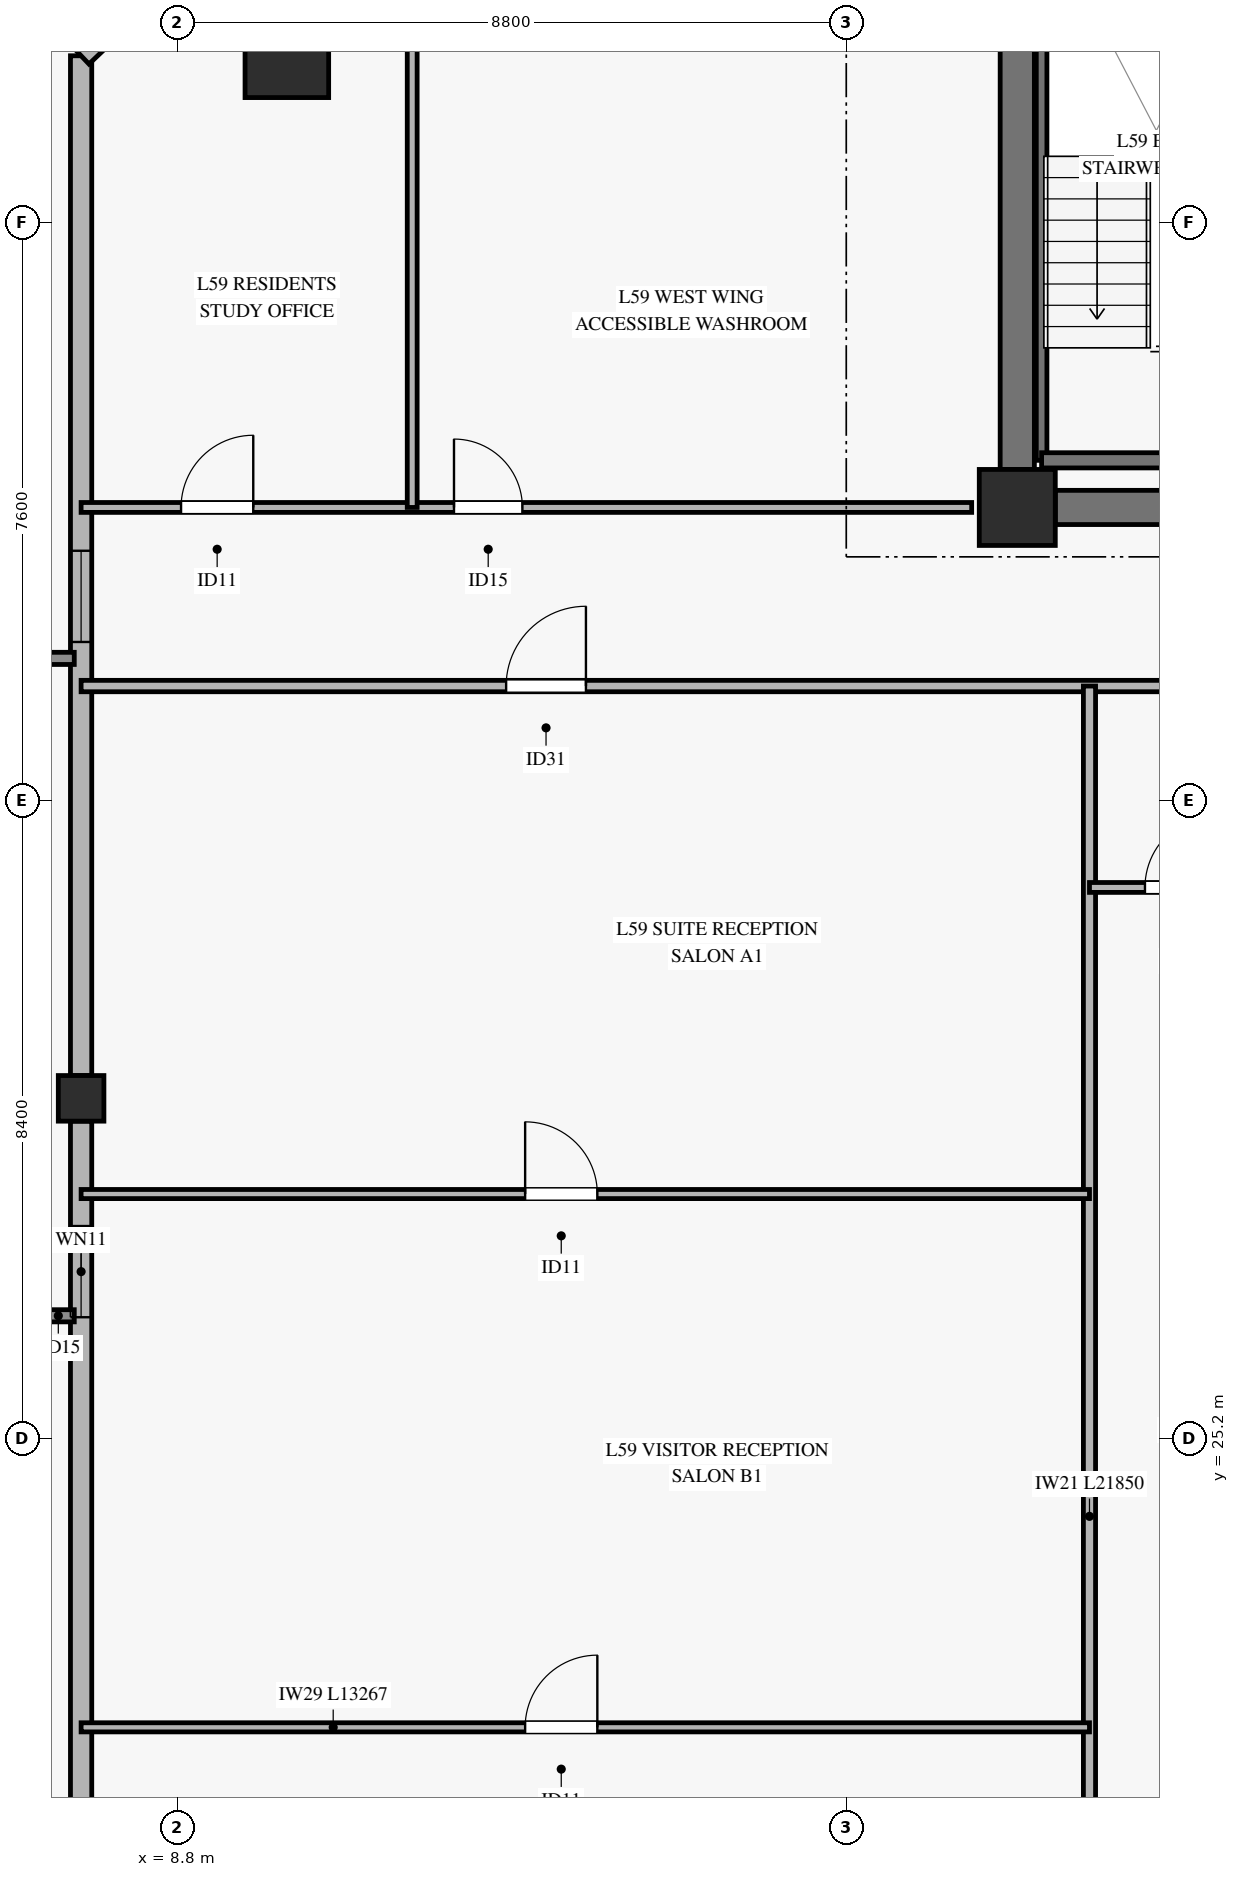
"""IFC4 building model, lengths in metres.
Left out: names, types, materials, properties, quantities, classifications, styles, units other than length and angle.
Written with IfcOpenShell. Run it as: python <this file> out.ifc"""

import sys

from ifc_helpers import new_model, si_unit, direction, frame, frame_2d, origin, origin_2d, place, context, subcontext, project, spatial, rectangle, hollow_rectangle, extrude, source, transform, mapped, element, fill, save


model = new_model("IFC4")
c1 = context("Model", 3, precision=1e-05, world=origin(), true_north=direction((0.0, 1.0)))
c2 = subcontext(c1, "Body", "Model", "MODEL_VIEW")
j1 = project(units=[si_unit("LENGTHUNIT", "METRE"), si_unit("PLANEANGLEUNIT", "RADIAN")], contexts=[c1])
p1 = place(None, origin())
s1 = spatial("IfcSite", under=j1, at=p1, CompositionType="ELEMENT")
p2 = place(p1, origin())
s2 = spatial("IfcBuilding", under=s1, at=p2, CompositionType="ELEMENT")
p3 = place(p2, frame((0.0, 0.0, 233.8)))
s3 = spatial("IfcBuildingStorey", under=s2, at=p3, CompositionType="ELEMENT", Elevation=233.8)
m1 = source(origin(), c2, "Body", "SweptSolid", [
    extrude(rectangle(XDim=1.0, YDim=1.0, at=origin_2d()), origin(), (0.0, 0.0, 1.0), 3.12),
])
p4 = place(p3, frame((19.85, 37.45, 0.0), z_axis=(0.0, 0.0, 1.0), x_axis=(1.0, 0.0, 0.0)))
e1 = element("IfcColumn", 1, at=p4, inside=s3, PredefinedType="PILASTER", context=c2, shape_type="MappedRepresentation", body=[
    mapped(m1, transform((0.0, 0.0, 0.0), x_axis=(1.0, 0.0, 0.0), y_axis=(0.0, 1.0, 0.0), z_axis=(0.0, 0.0, 1.0), scale=1.0)),
])
p5 = place(p3, frame((20.35, 37.45, 0.0), z_axis=(0.0, 0.0, 1.0), x_axis=(1.0, 0.0, 0.0)))
e2 = element("IfcWall", 2, at=p5, inside=s3, PredefinedType="SHEAR", context=c2, shape_type="SweptSolid", body=[
    extrude(rectangle(XDim=9.95, YDim=0.45, at=frame_2d((4.975, 0.0))), origin(), (0.0, 0.0, 1.0), 3.12),
])
p6 = place(p5, frame((4.2, 0.0, 0.0)))
e3 = element("IfcOpeningElement", 3, at=p6, cuts=e2, PredefinedType="OPENING", context=c2, shape_type="SweptSolid", body=[
    extrude(rectangle(XDim=1.2, YDim=2.15, at=frame_2d((0.6, 1.075))), frame((0.0, 0.235, 0.0), z_axis=(0.0, -1.0, 0.0), x_axis=(1.0, 0.0, 0.0)), (0.0, 0.0, 1.0), 0.47),
])
p7 = place(p3, frame((19.85, 37.95, 0.0), z_axis=(0.0, 0.0, 1.0), x_axis=(0.0, 1.0, 0.0)))
e4 = element("IfcWall", 4, at=p7, inside=s3, PredefinedType="SHEAR", context=c2, shape_type="SweptSolid", body=[
    extrude(rectangle(XDim=8.1, YDim=0.45, at=frame_2d((4.05, 0.0))), origin(), (0.0, 0.0, 1.0), 3.12),
])
m2 = source(origin(), c2, "Body", "SweptSolid", [
    extrude(hollow_rectangle(XDim=1.1, YDim=1.1, WallThickness=0.05, at=origin_2d()), origin(), (0.0, 0.0, 1.0), 3.142),
])
p8 = place(p3, frame((10.24, 43.393, 0.0), z_axis=(0.117410344374, 0.014608302278, 0.992976036236), x_axis=(-0.1234688995, 0.99234844226, 0.0)))
e5 = element("IfcColumn", 5, at=p8, inside=s3, PredefinedType="COLUMN", context=c2, shape_type="MappedRepresentation", body=[
    mapped(m2, transform((0.0, 0.0, 0.0), x_axis=(1.0, 0.0, 0.0), y_axis=(0.0, 1.0, 0.0), z_axis=(0.0, 0.0, 1.0), scale=1.0)),
])
m3 = source(origin(), c2, "Body", "SweptSolid", [
    extrude(hollow_rectangle(XDim=0.6, YDim=0.6, WallThickness=0.028, at=origin_2d()), origin(), (0.0, 0.0, 1.0), 3.182),
])
p9 = place(p3, frame((7.533, 29.675, 0.0), z_axis=(0.130446553885, 0.146483806686, 0.980574418878), x_axis=(-0.746804669772, 0.665043446104, 0.0)))
e6 = element("IfcColumn", 6, at=p9, inside=s3, PredefinedType="COLUMN", context=c2, shape_type="MappedRepresentation", body=[
    mapped(m3, transform((0.0, 0.0, 0.0), x_axis=(1.0, 0.0, 0.0), y_axis=(0.0, 1.0, 0.0), z_axis=(0.0, 0.0, 1.0), scale=1.0)),
])
p10 = place(p3, frame((7.533, 15.957, 0.0), z_axis=(0.0, 0.0, 1.0), x_axis=(0.0, 1.0, 0.0)))
e7 = element("IfcWall", 7, at=p10, inside=s3, PredefinedType="SOLIDWALL", context=c2, shape_type="SweptSolid", body=[
    extrude(rectangle(XDim=13.418, YDim=0.28, at=frame_2d((6.709, 0.0))), origin(), (0.0, 0.0, 1.0), 2.75),
])
p11 = place(p10, frame((10.838, 0.0, 0.45)))
e8 = element("IfcOpeningElement", 8, at=p11, cuts=e7, PredefinedType="OPENING", context=c2, shape_type="SweptSolid", body=[
    extrude(rectangle(XDim=1.2, YDim=2.0, at=frame_2d((0.6, 1.0))), frame((0.0, 0.15, 0.0), z_axis=(0.0, -1.0, 0.0), x_axis=(1.0, 0.0, 0.0)), (0.0, 0.0, 1.0), 0.3),
])
p12 = place(p3, frame((7.533, 29.975, 0.0), z_axis=(0.0, 0.0, 1.0), x_axis=(0.0, 1.0, 0.0)))
e9 = element("IfcWall", 9, at=p12, inside=s3, PredefinedType="SOLIDWALL", context=c2, shape_type="SweptSolid", body=[
    extrude(rectangle(XDim=13.418, YDim=0.28, at=frame_2d((6.709, 0.0))), origin(), (0.0, 0.0, 1.0), 2.75),
])
p13 = place(p12, frame((5.705, 0.0, 0.45)))
e10 = element("IfcOpeningElement", 10, at=p13, cuts=e9, PredefinedType="OPENING", context=c2, shape_type="SweptSolid", body=[
    extrude(rectangle(XDim=1.2, YDim=2.0, at=frame_2d((0.6, 1.0))), frame((0.0, 0.15, 0.0), z_axis=(0.0, -1.0, 0.0), x_axis=(1.0, 0.0, 0.0)), (0.0, 0.0, 1.0), 0.3),
])
p14 = place(p3, frame((10.54, 46.25, 0.0), z_axis=(0.0, 0.0, 1.0), x_axis=(-0.724974450633, -0.688775758814, 0.0)))
e11 = element("IfcWall", 11, at=p14, inside=s3, PredefinedType="SOLIDWALL", context=c2, shape_type="SweptSolid", body=[
    extrude(rectangle(XDim=4.148, YDim=0.3, at=frame_2d((2.074, 0.0))), origin(), (0.0, 0.0, 1.0), 2.75),
])
p15 = place(p14, frame((1.274, 0.0, 0.45)))
e12 = element("IfcOpeningElement", 12, at=p15, cuts=e11, PredefinedType="OPENING", context=c2, shape_type="SweptSolid", body=[
    extrude(rectangle(XDim=1.6, YDim=2.0, at=frame_2d((0.8, 1.0))), frame((0.0, 0.16, 0.0), z_axis=(0.0, -1.0, 0.0), x_axis=(1.0, 0.0, 0.0)), (0.0, 0.0, 1.0), 0.32),
])
p16 = place(p3, frame((20.17, 38.07, 0.0), z_axis=(0.0, 0.0, 1.0), x_axis=(0.0, 1.0, 0.0)))
e13 = element("IfcWall", 13, at=p16, inside=s3, PredefinedType="SOLIDWALL", context=c2, shape_type="SweptSolid", body=[
    extrude(rectangle(XDim=7.25, YDim=0.14, at=frame_2d((3.625, 0.0))), origin(), (0.0, 0.0, 1.0), 3.4),
])
p17 = place(p3, frame((20.17, 38.07, 0.0), z_axis=(0.0, 0.0, 1.0), x_axis=(1.0, 0.0, 0.0)))
e14 = element("IfcWall", 14, at=p17, inside=s3, PredefinedType="SOLIDWALL", context=c2, shape_type="SweptSolid", body=[
    extrude(rectangle(XDim=3.05, YDim=0.2, at=frame_2d((1.525, 0.0))), origin(), (0.0, 0.0, 1.0), 3.4),
])
p18 = place(p3, frame((7.533, 35.1, 0.0), z_axis=(0.0, 0.0, 1.0), x_axis=(1.0, 0.0, 0.0)))
e15 = element("IfcWall", 15, at=p18, inside=s3, PredefinedType="PARTITIONING", context=c2, shape_type="SweptSolid", body=[
    extrude(rectangle(XDim=55.334, YDim=0.15, at=frame_2d((27.667, 0.0))), origin(), (0.0, 0.0, 1.0), 2.305),
])
p19 = place(p18, frame((5.592, 0.0, 0.0)))
e16 = element("IfcOpeningElement", 16, at=p19, cuts=e15, PredefinedType="OPENING", context=c2, shape_type="SweptSolid", body=[
    extrude(rectangle(XDim=1.05, YDim=2.15, at=frame_2d((0.525, 1.075))), frame((0.0, 0.085, 0.0), z_axis=(0.0, -1.0, 0.0), x_axis=(1.0, 0.0, 0.0)), (0.0, 0.0, 1.0), 0.17),
])
p20 = place(p18, frame((17.207, 0.0, 0.0)))
e17 = element("IfcOpeningElement", 17, at=p20, cuts=e15, PredefinedType="OPENING", context=c2, shape_type="SweptSolid", body=[
    extrude(rectangle(XDim=1.05, YDim=2.15, at=frame_2d((0.525, 1.075))), frame((0.0, 0.085, 0.0), z_axis=(0.0, -1.0, 0.0), x_axis=(1.0, 0.0, 0.0)), (0.0, 0.0, 1.0), 0.17),
])
p21 = place(p18, frame((25.884, 0.0, 0.0)))
e18 = element("IfcOpeningElement", 18, at=p21, cuts=e15, PredefinedType="OPENING", context=c2, shape_type="SweptSolid", body=[
    extrude(rectangle(XDim=1.05, YDim=2.15, at=frame_2d((0.525, 1.075))), frame((0.0, 0.085, 0.0), z_axis=(0.0, -1.0, 0.0), x_axis=(1.0, 0.0, 0.0)), (0.0, 0.0, 1.0), 0.17),
])
p22 = place(p18, frame((35.712, 0.0, 0.0)))
e19 = element("IfcOpeningElement", 19, at=p22, cuts=e15, PredefinedType="OPENING", context=c2, shape_type="SweptSolid", body=[
    extrude(rectangle(XDim=1.05, YDim=2.15, at=frame_2d((0.525, 1.075))), frame((0.0, 0.085, 0.0), z_axis=(0.0, -1.0, 0.0), x_axis=(1.0, 0.0, 0.0)), (0.0, 0.0, 1.0), 0.17),
])
p23 = place(p18, frame((46.92, 0.0, 0.0)))
e20 = element("IfcOpeningElement", 20, at=p23, cuts=e15, PredefinedType="OPENING", context=c2, shape_type="SweptSolid", body=[
    extrude(rectangle(XDim=1.05, YDim=2.15, at=frame_2d((0.525, 1.075))), frame((0.0, 0.085, 0.0), z_axis=(0.0, -1.0, 0.0), x_axis=(1.0, 0.0, 0.0)), (0.0, 0.0, 1.0), 0.17),
])
p24 = place(p3, frame((20.8, 13.25, 0.0), z_axis=(0.0, 0.0, 1.0), x_axis=(0.0, 1.0, 0.0)))
e21 = element("IfcWall", 21, at=p24, inside=s3, PredefinedType="PARTITIONING", context=c2, shape_type="SweptSolid", body=[
    extrude(rectangle(XDim=21.85, YDim=0.16, at=frame_2d((10.925, 0.0))), origin(), (0.0, 0.0, 1.0), 2.705),
])
p25 = place(p3, frame((7.533, 21.399, 0.0), z_axis=(0.0, 0.0, 1.0), x_axis=(1.0, 0.0, 0.0)))
e22 = element("IfcWall", 22, at=p25, inside=s3, PredefinedType="PARTITIONING", context=c2, shape_type="SweptSolid", body=[
    extrude(rectangle(XDim=13.267, YDim=0.12, at=frame_2d((6.634, 0.0))), origin(), (0.0, 0.0, 1.0), 2.305),
])
p26 = place(p25, frame((5.842, 0.0, 0.0)))
e23 = element("IfcOpeningElement", 23, at=p26, cuts=e22, PredefinedType="OPENING", context=c2, shape_type="SweptSolid", body=[
    extrude(rectangle(XDim=0.95, YDim=2.1, at=frame_2d((0.475, 1.05))), frame((0.0, 0.07, 0.0), z_axis=(0.0, -1.0, 0.0), x_axis=(1.0, 0.0, 0.0)), (0.0, 0.0, 1.0), 0.14),
])
p27 = place(p3, frame((7.533, 28.416, 0.0), z_axis=(0.0, 0.0, 1.0), x_axis=(1.0, 0.0, 0.0)))
e24 = element("IfcWall", 24, at=p27, inside=s3, PredefinedType="PARTITIONING", context=c2, shape_type="SweptSolid", body=[
    extrude(rectangle(XDim=13.267, YDim=0.12, at=frame_2d((6.634, 0.0))), origin(), (0.0, 0.0, 1.0), 2.305),
])
p28 = place(p27, frame((5.842, 0.0, 0.0)))
e25 = element("IfcOpeningElement", 25, at=p28, cuts=e24, PredefinedType="OPENING", context=c2, shape_type="SweptSolid", body=[
    extrude(rectangle(XDim=0.95, YDim=2.1, at=frame_2d((0.475, 1.05))), frame((0.0, 0.07, 0.0), z_axis=(0.0, -1.0, 0.0), x_axis=(1.0, 0.0, 0.0)), (0.0, 0.0, 1.0), 0.14),
])
p29 = place(p3, frame((20.8, 32.45, 0.0), z_axis=(0.0, 0.0, 1.0), x_axis=(1.0, 0.0, 0.0)))
e26 = element("IfcWall", 26, at=p29, inside=s3, PredefinedType="PARTITIONING", context=c2, shape_type="SweptSolid", body=[
    extrude(rectangle(XDim=2.17, YDim=0.13, at=frame_2d((1.085, 0.0))), origin(), (0.0, 0.0, 1.0), 3.12),
])
p30 = place(p29, frame((0.73, 0.0, 0.0)))
e27 = element("IfcOpeningElement", 27, at=p30, cuts=e26, PredefinedType="OPENING", context=c2, shape_type="SweptSolid", body=[
    extrude(rectangle(XDim=0.95, YDim=2.1, at=frame_2d((0.475, 1.05))), frame((0.0, 0.075, 0.0), z_axis=(0.0, -1.0, 0.0), x_axis=(1.0, 0.0, 0.0)), (0.0, 0.0, 1.0), 0.15),
])
p31 = place(p3, frame((7.533, 37.45, 0.0), z_axis=(0.0, 0.0, 1.0), x_axis=(1.0, 0.0, 0.0)))
e28 = element("IfcWall", 28, at=p31, inside=s3, PredefinedType="PARTITIONING", context=c2, shape_type="SweptSolid", body=[
    extrude(rectangle(XDim=11.717, YDim=0.13, at=frame_2d((5.858, 0.0))), origin(), (0.0, 0.0, 1.0), 2.755),
])
p32 = place(p31, frame((1.315, 0.0, 0.0)))
e29 = element("IfcOpeningElement", 29, at=p32, cuts=e28, PredefinedType="OPENING", context=c2, shape_type="SweptSolid", body=[
    extrude(rectangle(XDim=0.95, YDim=2.1, at=frame_2d((0.475, 1.05))), frame((0.0, 0.075, 0.0), z_axis=(0.0, -1.0, 0.0), x_axis=(1.0, 0.0, 0.0)), (0.0, 0.0, 1.0), 0.15),
])
p33 = place(p31, frame((4.906, 0.0, 0.0)))
e30 = element("IfcOpeningElement", 30, at=p33, cuts=e28, PredefinedType="OPENING", context=c2, shape_type="SweptSolid", body=[
    extrude(rectangle(XDim=0.9, YDim=2.1, at=frame_2d((0.45, 1.05))), frame((0.0, 0.075, 0.0), z_axis=(0.0, -1.0, 0.0), x_axis=(1.0, 0.0, 0.0)), (0.0, 0.0, 1.0), 0.15),
])
p34 = place(p3, frame((11.889, 37.45, 0.0), z_axis=(0.0, 0.0, 1.0), x_axis=(0.0, 1.0, 0.0)))
e31 = element("IfcWall", 31, at=p34, inside=s3, PredefinedType="PARTITIONING", context=c2, shape_type="SweptSolid", body=[
    extrude(rectangle(XDim=8.8, YDim=0.13, at=frame_2d((4.4, 0.0))), origin(), (0.0, 0.0, 1.0), 3.12),
])
m4 = source(origin(), c2, "Body", "SweptSolid", [
    extrude(rectangle(XDim=1.2, YDim=2.0, at=frame_2d((0.6, 1.0))), frame((0.0, 0.03, 0.0), z_axis=(0.0, -1.0, 0.0), x_axis=(1.0, 0.0, 0.0)), (0.0, 0.0, 1.0), 0.06),
])
p35 = place(p11, origin())
e32 = element("IfcWindow", 32, at=p35, inside=s3, PartitioningType="SINGLE_PANEL", PredefinedType="WINDOW", context=c2, shape_type="MappedRepresentation", body=[
    mapped(m4, transform((0.0, 0.0, 0.0), x_axis=(1.0, 0.0, 0.0), y_axis=(0.0, 1.0, 0.0), z_axis=(0.0, 0.0, 1.0), scale=1.0)),
])
fill(e8, e32)
p36 = place(p13, origin())
e33 = element("IfcWindow", 33, at=p36, inside=s3, PartitioningType="SINGLE_PANEL", PredefinedType="WINDOW", context=c2, shape_type="MappedRepresentation", body=[
    mapped(m4, transform((0.0, 0.0, 0.0), x_axis=(1.0, 0.0, 0.0), y_axis=(0.0, 1.0, 0.0), z_axis=(0.0, 0.0, 1.0), scale=1.0)),
])
fill(e10, e33)
m5 = source(origin(), c2, "Body", "SweptSolid", [
    extrude(rectangle(XDim=1.05, YDim=2.15, at=frame_2d((0.525, 1.075))), frame((0.0, 0.025, 0.0), z_axis=(0.0, -1.0, 0.0), x_axis=(1.0, 0.0, 0.0)), (0.0, 0.0, 1.0), 0.05),
])
p37 = place(p19, origin())
e34 = element("IfcDoor", 34, at=p37, inside=s3, OperationType="SINGLE_SWING_RIGHT", PredefinedType="DOOR", context=c2, shape_type="MappedRepresentation", body=[
    mapped(m5, transform((0.0, 0.0, 0.0), x_axis=(1.0, 0.0, 0.0), y_axis=(0.0, 1.0, 0.0), z_axis=(0.0, 0.0, 1.0), scale=1.0)),
])
fill(e16, e34)
m6 = source(origin(), c2, "Body", "SweptSolid", [
    extrude(rectangle(XDim=0.95, YDim=2.1, at=frame_2d((0.475, 1.05))), frame((0.0, 0.025, 0.0), z_axis=(0.0, -1.0, 0.0), x_axis=(1.0, 0.0, 0.0)), (0.0, 0.0, 1.0), 0.05),
])
p38 = place(p28, origin())
e35 = element("IfcDoor", 35, at=p38, inside=s3, OperationType="SINGLE_SWING_LEFT", PredefinedType="DOOR", context=c2, shape_type="MappedRepresentation", body=[
    mapped(m6, transform((0.0, 0.0, 0.0), x_axis=(1.0, 0.0, 0.0), y_axis=(0.0, 1.0, 0.0), z_axis=(0.0, 0.0, 1.0), scale=1.0)),
])
fill(e25, e35)
p39 = place(p26, origin())
e36 = element("IfcDoor", 36, at=p39, inside=s3, OperationType="SINGLE_SWING_RIGHT", PredefinedType="DOOR", context=c2, shape_type="MappedRepresentation", body=[
    mapped(m6, transform((0.0, 0.0, 0.0), x_axis=(1.0, 0.0, 0.0), y_axis=(0.0, 1.0, 0.0), z_axis=(0.0, 0.0, 1.0), scale=1.0)),
])
fill(e23, e36)
p40 = place(p30, origin())
e37 = element("IfcDoor", 37, at=p40, inside=s3, OperationType="SINGLE_SWING_RIGHT", PredefinedType="DOOR", context=c2, shape_type="MappedRepresentation", body=[
    mapped(m6, transform((0.0, 0.0, 0.0), x_axis=(1.0, 0.0, 0.0), y_axis=(0.0, 1.0, 0.0), z_axis=(0.0, 0.0, 1.0), scale=1.0)),
])
fill(e27, e37)
p41 = place(p32, origin())
e38 = element("IfcDoor", 38, at=p41, inside=s3, OperationType="SINGLE_SWING_RIGHT", PredefinedType="DOOR", context=c2, shape_type="MappedRepresentation", body=[
    mapped(m6, transform((0.0, 0.0, 0.0), x_axis=(1.0, 0.0, 0.0), y_axis=(0.0, 1.0, 0.0), z_axis=(0.0, 0.0, 1.0), scale=1.0)),
])
fill(e29, e38)
m7 = source(origin(), c2, "Body", "SweptSolid", [
    extrude(rectangle(XDim=0.9, YDim=2.1, at=frame_2d((0.45, 1.05))), frame((0.0, 0.025, 0.0), z_axis=(0.0, -1.0, 0.0), x_axis=(1.0, 0.0, 0.0)), (0.0, 0.0, 1.0), 0.05),
])
p42 = place(p33, origin())
e39 = element("IfcDoor", 39, at=p42, inside=s3, OperationType="SINGLE_SWING_LEFT", PredefinedType="DOOR", context=c2, shape_type="MappedRepresentation", body=[
    mapped(m7, transform((0.0, 0.0, 0.0), x_axis=(1.0, 0.0, 0.0), y_axis=(0.0, 1.0, 0.0), z_axis=(0.0, 0.0, 1.0), scale=1.0)),
])
fill(e30, e39)
save(model, sys.argv[1])
